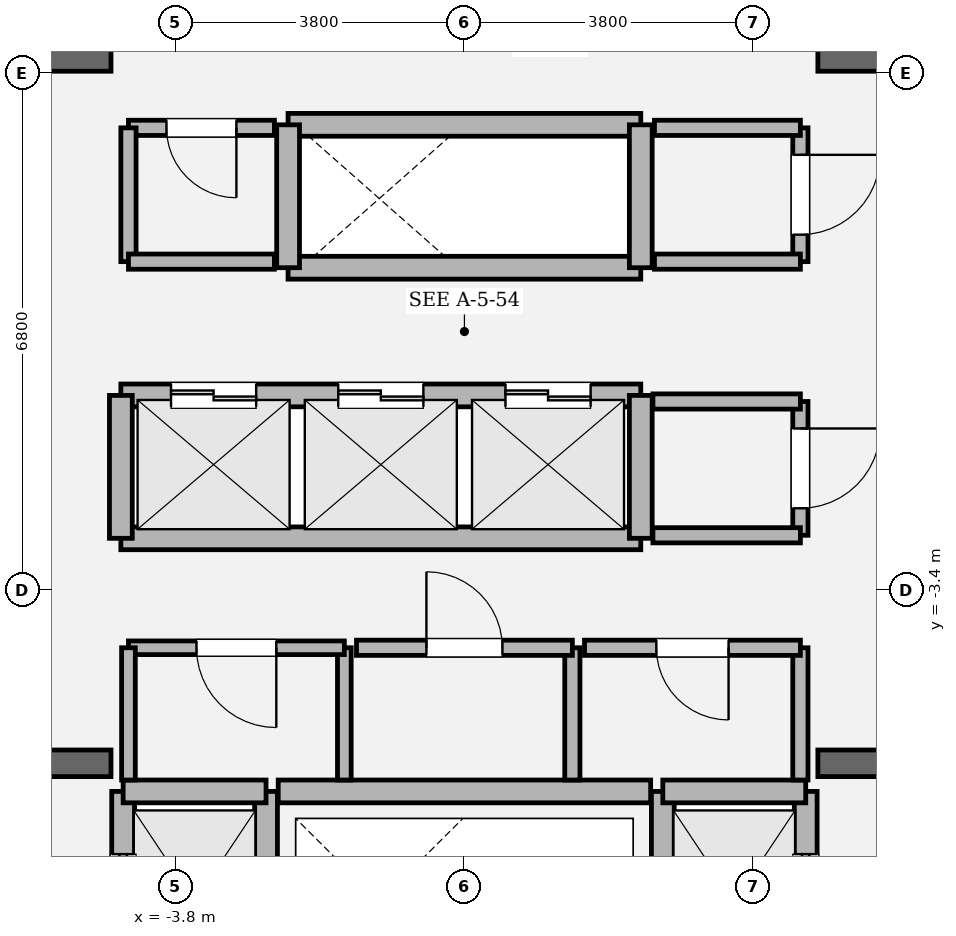
"""IFC4 building model, lengths in metres.
Left out: names, types, materials, properties, quantities, classifications, styles, units other than length and angle.
Written with IfcOpenShell. Run it as: python <this file> out.ifc"""

import sys

from ifc_helpers import new_model, si_unit, direction, frame, frame_2d, origin, place, context, subcontext, project, spatial, rectangle, extrude, element, fill, save


model = new_model("IFC4")
c1 = context("Model", 3, precision=1e-05, world=origin(), true_north=direction((0.0, 1.0)))
c2 = subcontext(c1, "Body", "Model", "MODEL_VIEW")
j1 = project(units=[si_unit("LENGTHUNIT", "METRE"), si_unit("PLANEANGLEUNIT", "RADIAN")], contexts=[c1])
p1 = place(None, origin())
s1 = spatial("IfcSite", under=j1, at=p1, CompositionType="ELEMENT")
p2 = place(p1, origin())
s2 = spatial("IfcBuilding", under=s1, at=p2, CompositionType="ELEMENT")
p3 = place(p2, frame((0.0, 0.0, 267.6)))
s3 = spatial("IfcBuildingStorey", under=s2, at=p3, CompositionType="ELEMENT", Elevation=267.6)
p4 = place(p3, frame((-9.925, -5.68, 0.0), z_axis=(0.0, 0.0, 1.0), x_axis=(1.0, 0.0, 0.0)))
e1 = element("IfcWall", 1, at=p4, inside=s3, PredefinedType="SOLIDWALL", context=c2, shape_type="SweptSolid", body=[
    extrude(rectangle(XDim=5.275, YDim=0.35, at=frame_2d((2.638, 0.0))), origin(), (0.0, 0.0, 1.0), 4.05),
])
p5 = place(p4, frame((1.385, 0.0, 0.0)))
e2 = element("IfcOpeningElement", 2, at=p5, cuts=e1, PredefinedType="OPENING", context=c2, shape_type="SweptSolid", body=[
    extrude(rectangle(XDim=1.18, YDim=2.2, at=frame_2d((0.59, 1.1))), frame((0.0, 0.185, 0.0), z_axis=(0.0, -1.0, 0.0), x_axis=(1.0, 0.0, 0.0)), (0.0, 0.0, 1.0), 0.37),
])
p6 = place(p3, frame((4.65, -5.68, 0.0), z_axis=(0.0, 0.0, 1.0), x_axis=(1.0, 0.0, 0.0)))
e3 = element("IfcWall", 3, at=p6, inside=s3, PredefinedType="SOLIDWALL", context=c2, shape_type="SweptSolid", body=[
    extrude(rectangle(XDim=5.275, YDim=0.35, at=frame_2d((2.638, 0.0))), origin(), (0.0, 0.0, 1.0), 4.05),
])
p7 = place(p6, frame((2.71, 0.0, 0.0)))
e4 = element("IfcOpeningElement", 4, at=p7, cuts=e3, PredefinedType="OPENING", context=c2, shape_type="SweptSolid", body=[
    extrude(rectangle(XDim=1.18, YDim=2.2, at=frame_2d((0.59, 1.1))), frame((0.0, 0.185, 0.0), z_axis=(0.0, -1.0, 0.0), x_axis=(1.0, 0.0, 0.0)), (0.0, 0.0, 1.0), 0.37),
])
for number, where, z_axis, x_axis in (
    (5, (-9.925, 3.6, 0.0), (0.0, 0.0, 1.0), (1.0, 0.0, 0.0)),
    (6, (4.65, 3.6, 0.0), (0.0, 0.0, 1.0), (1.0, 0.0, 0.0)),
):
    element("IfcWall", number, at=place(p3, frame(where, z_axis=z_axis, x_axis=x_axis)), inside=s3, PredefinedType="SOLIDWALL", context=c2, shape_type="SweptSolid", body=[
        extrude(rectangle(XDim=5.275, YDim=0.35, at=frame_2d((2.638, 0.0))), origin(), (0.0, 0.0, 1.0), 4.05),
    ])
p8 = place(p3, frame((-4.49, -8.82, 0.0), z_axis=(0.0, 0.0, 1.0), x_axis=(0.0, 1.0, 0.0)))
e7 = element("IfcWall", 7, at=p8, inside=s3, PredefinedType="SOLIDWALL", context=c2, shape_type="SweptSolid", body=[
    extrude(rectangle(XDim=2.77, YDim=0.3, at=frame_2d((1.385, 0.0))), origin(), (0.0, 0.0, 1.0), 3.85),
])
p9 = place(p8, frame((0.825, 0.0, 0.0)))
e8 = element("IfcOpeningElement", 8, at=p9, cuts=e7, PredefinedType="OPENING", context=c2, shape_type="SweptSolid", body=[
    extrude(rectangle(XDim=1.12, YDim=2.25, at=frame_2d((0.56, 1.125))), frame((0.0, 0.16, 0.0), z_axis=(0.0, -1.0, 0.0), x_axis=(1.0, 0.0, 0.0)), (0.0, 0.0, 1.0), 0.32),
])
p10 = place(p3, frame((-2.61, -8.82, 0.0), z_axis=(0.0, 0.0, 1.0), x_axis=(0.0, 1.0, 0.0)))
e9 = element("IfcWall", 9, at=p10, inside=s3, PredefinedType="SOLIDWALL", context=c2, shape_type="SweptSolid", body=[
    extrude(rectangle(XDim=2.77, YDim=0.3, at=frame_2d((1.385, 0.0))), origin(), (0.0, 0.0, 1.0), 3.85),
])
p11 = place(p3, frame((-4.49, -6.05, 0.0), z_axis=(0.0, 0.0, 1.0), x_axis=(1.0, 0.0, 0.0)))
e10 = element("IfcWall", 10, at=p11, inside=s3, PredefinedType="SOLIDWALL", context=c2, shape_type="SweptSolid", body=[
    extrude(rectangle(XDim=1.88, YDim=0.3, at=frame_2d((0.94, 0.0))), origin(), (0.0, 0.0, 1.0), 3.85),
])
p12 = place(p3, frame((4.49, -8.82, 0.0), z_axis=(0.0, 0.0, 1.0), x_axis=(0.0, 1.0, 0.0)))
e11 = element("IfcWall", 11, at=p12, inside=s3, PredefinedType="SOLIDWALL", context=c2, shape_type="SweptSolid", body=[
    extrude(rectangle(XDim=2.77, YDim=0.3, at=frame_2d((1.385, 0.0))), origin(), (0.0, 0.0, 1.0), 3.85),
])
p13 = place(p12, frame((0.825, 0.0, 0.0)))
e12 = element("IfcOpeningElement", 12, at=p13, cuts=e11, PredefinedType="OPENING", context=c2, shape_type="SweptSolid", body=[
    extrude(rectangle(XDim=1.12, YDim=2.25, at=frame_2d((0.56, 1.125))), frame((0.0, 0.16, 0.0), z_axis=(0.0, -1.0, 0.0), x_axis=(1.0, 0.0, 0.0)), (0.0, 0.0, 1.0), 0.32),
])
p14 = place(p3, frame((2.61, -8.82, 0.0), z_axis=(0.0, 0.0, 1.0), x_axis=(0.0, 1.0, 0.0)))
e13 = element("IfcWall", 13, at=p14, inside=s3, PredefinedType="SOLIDWALL", context=c2, shape_type="SweptSolid", body=[
    extrude(rectangle(XDim=2.77, YDim=0.3, at=frame_2d((1.385, 0.0))), origin(), (0.0, 0.0, 1.0), 3.85),
])
p15 = place(p3, frame((2.61, -6.05, 0.0), z_axis=(0.0, 0.0, 1.0), x_axis=(1.0, 0.0, 0.0)))
e14 = element("IfcWall", 14, at=p15, inside=s3, PredefinedType="SOLIDWALL", context=c2, shape_type="SweptSolid", body=[
    extrude(rectangle(XDim=1.88, YDim=0.3, at=frame_2d((0.94, 0.0))), origin(), (0.0, 0.0, 1.0), 3.85),
])
p16 = place(p3, frame((-4.52, -0.84, 0.0), z_axis=(0.0, 0.0, 1.0), x_axis=(1.0, 0.0, 0.0)))
e15 = element("IfcWall", 15, at=p16, inside=s3, PredefinedType="SOLIDWALL", context=c2, shape_type="SweptSolid", body=[
    extrude(rectangle(XDim=6.84, YDim=0.3, at=frame_2d((3.42, 0.0))), origin(), (0.0, 0.0, 1.0), 3.85),
])
p17 = place(p16, frame((0.66, 0.0, 0.0)))
e16 = element("IfcOpeningElement", 16, at=p17, cuts=e15, PredefinedType="OPENING", context=c2, shape_type="SweptSolid", body=[
    extrude(rectangle(XDim=1.12, YDim=2.25, at=frame_2d((0.56, 1.125))), frame((0.0, 0.16, 0.0), z_axis=(0.0, -1.0, 0.0), x_axis=(1.0, 0.0, 0.0)), (0.0, 0.0, 1.0), 0.32),
])
p18 = place(p16, frame((2.86, 0.0, 0.0)))
e17 = element("IfcOpeningElement", 17, at=p18, cuts=e15, PredefinedType="OPENING", context=c2, shape_type="SweptSolid", body=[
    extrude(rectangle(XDim=1.12, YDim=2.25, at=frame_2d((0.56, 1.125))), frame((0.0, 0.16, 0.0), z_axis=(0.0, -1.0, 0.0), x_axis=(1.0, 0.0, 0.0)), (0.0, 0.0, 1.0), 0.32),
])
p19 = place(p16, frame((5.06, 0.0, 0.0)))
e18 = element("IfcOpeningElement", 18, at=p19, cuts=e15, PredefinedType="OPENING", context=c2, shape_type="SweptSolid", body=[
    extrude(rectangle(XDim=1.12, YDim=2.25, at=frame_2d((0.56, 1.125))), frame((0.0, 0.16, 0.0), z_axis=(0.0, -1.0, 0.0), x_axis=(1.0, 0.0, 0.0)), (0.0, 0.0, 1.0), 0.32),
])
p20 = place(p3, frame((-4.52, -2.72, 0.0), z_axis=(0.0, 0.0, 1.0), x_axis=(1.0, 0.0, 0.0)))
e19 = element("IfcWall", 19, at=p20, inside=s3, PredefinedType="SOLIDWALL", context=c2, shape_type="SweptSolid", body=[
    extrude(rectangle(XDim=6.84, YDim=0.3, at=frame_2d((3.42, 0.0))), origin(), (0.0, 0.0, 1.0), 3.85),
])
for number, where, z_axis, x_axis in (
    (20, (-4.52, -2.72, 0.0), (0.0, 0.0, 1.0), (0.0, 1.0, 0.0)),
    (21, (2.32, -2.72, 0.0), (0.0, 0.0, 1.0), (0.0, 1.0, 0.0)),
):
    element("IfcWall", number, at=place(p3, frame(where, z_axis=z_axis, x_axis=x_axis)), inside=s3, PredefinedType="SOLIDWALL", context=c2, shape_type="SweptSolid", body=[
        extrude(rectangle(XDim=1.88, YDim=0.3, at=frame_2d((0.94, 0.0))), origin(), (0.0, 0.0, 1.0), 3.85),
    ])
for number, where, z_axis, x_axis in (
    (22, (-2.32, 0.84, 0.0), (0.0, 0.0, 1.0), (1.0, 0.0, 0.0)),
    (23, (-2.32, 2.72, 0.0), (0.0, 0.0, 1.0), (1.0, 0.0, 0.0)),
):
    element("IfcWall", number, at=place(p3, frame(where, z_axis=z_axis, x_axis=x_axis)), inside=s3, PredefinedType="SOLIDWALL", context=c2, shape_type="SweptSolid", body=[
        extrude(rectangle(XDim=4.64, YDim=0.3, at=frame_2d((2.32, 0.0))), origin(), (0.0, 0.0, 1.0), 3.85),
    ])
for number, where, z_axis, x_axis in (
    (24, (-2.32, 0.84, 0.0), (0.0, 0.0, 1.0), (0.0, 1.0, 0.0)),
    (25, (2.32, 0.84, 0.0), (0.0, 0.0, 1.0), (0.0, 1.0, 0.0)),
):
    element("IfcWall", number, at=place(p3, frame(where, z_axis=z_axis, x_axis=x_axis)), inside=s3, PredefinedType="SOLIDWALL", context=c2, shape_type="SweptSolid", body=[
        extrude(rectangle(XDim=1.88, YDim=0.3, at=frame_2d((0.94, 0.0))), origin(), (0.0, 0.0, 1.0), 3.85),
    ])
p21 = place(p3, frame((-2.45, -6.05, 0.0), z_axis=(0.0, 0.0, 1.0), x_axis=(1.0, 0.0, 0.0)))
e26 = element("IfcWall", 26, at=p21, inside=s3, PredefinedType="SOLIDWALL", context=c2, shape_type="SweptSolid", body=[
    extrude(rectangle(XDim=4.9, YDim=0.3, at=frame_2d((2.45, 0.0))), origin(), (0.0, 0.0, 1.0), 3.85),
])
p22 = place(p3, frame((-1.58, -5.9, 0.0), z_axis=(0.0, 0.0, 1.0), x_axis=(0.0, 1.0, 0.0)))
e27 = element("IfcWall", 27, at=p22, inside=s3, PredefinedType="PARTITIONING", context=c2, shape_type="SweptSolid", body=[
    extrude(rectangle(XDim=1.74, YDim=0.18, at=frame_2d((0.87, 0.0))), origin(), (0.0, 0.0, 1.0), 3.85),
])
p23 = place(p3, frame((-1.58, -4.16, 0.0), z_axis=(0.0, 0.0, 1.0), x_axis=(-1.0, 0.0, 0.0)))
e28 = element("IfcWall", 28, at=p23, inside=s3, PredefinedType="PARTITIONING", context=c2, shape_type="SweptSolid", body=[
    extrude(rectangle(XDim=2.84, YDim=0.18, at=frame_2d((1.42, 0.0))), origin(), (0.0, 0.0, 1.0), 3.85),
])
p24 = place(p23, frame((0.895, 0.0, 0.0)))
e29 = element("IfcOpeningElement", 29, at=p24, cuts=e28, PredefinedType="OPENING", context=c2, shape_type="SweptSolid", body=[
    extrude(rectangle(XDim=1.05, YDim=2.2, at=frame_2d((0.525, 1.1))), frame((0.0, 0.1, 0.0), z_axis=(0.0, -1.0, 0.0), x_axis=(1.0, 0.0, 0.0)), (0.0, 0.0, 1.0), 0.2),
])
p25 = place(p3, frame((-4.42, -4.16, 0.0), z_axis=(0.0, 0.0, 1.0), x_axis=(0.0, -1.0, 0.0)))
e30 = element("IfcWall", 30, at=p25, inside=s3, PredefinedType="PARTITIONING", context=c2, shape_type="SweptSolid", body=[
    extrude(rectangle(XDim=1.74, YDim=0.18, at=frame_2d((0.87, 0.0))), origin(), (0.0, 0.0, 1.0), 3.85),
])
p26 = place(p3, frame((1.42, -5.9, 0.0), z_axis=(0.0, 0.0, 1.0), x_axis=(0.0, 1.0, 0.0)))
e31 = element("IfcWall", 31, at=p26, inside=s3, PredefinedType="SOLIDWALL", context=c2, shape_type="SweptSolid", body=[
    extrude(rectangle(XDim=1.74, YDim=0.2, at=frame_2d((0.87, 0.0))), origin(), (0.0, 0.0, 1.0), 3.85),
])
p27 = place(p3, frame((1.42, -4.16, 0.0), z_axis=(0.0, 0.0, 1.0), x_axis=(-1.0, 0.0, 0.0)))
e32 = element("IfcWall", 32, at=p27, inside=s3, PredefinedType="SOLIDWALL", context=c2, shape_type="SweptSolid", body=[
    extrude(rectangle(XDim=2.84, YDim=0.2, at=frame_2d((1.42, 0.0))), origin(), (0.0, 0.0, 1.0), 3.85),
])
p28 = place(p27, frame((0.92, 0.0, 0.0)))
e33 = element("IfcOpeningElement", 33, at=p28, cuts=e32, PredefinedType="OPENING", context=c2, shape_type="SweptSolid", body=[
    extrude(rectangle(XDim=1.0, YDim=2.15, at=frame_2d((0.5, 1.075))), frame((0.0, 0.11, 0.0), z_axis=(0.0, -1.0, 0.0), x_axis=(1.0, 0.0, 0.0)), (0.0, 0.0, 1.0), 0.22),
])
p29 = place(p3, frame((4.42, -5.9, 0.0), z_axis=(0.0, 0.0, 1.0), x_axis=(0.0, 1.0, 0.0)))
e34 = element("IfcWall", 34, at=p29, inside=s3, PredefinedType="SOLIDWALL", context=c2, shape_type="SweptSolid", body=[
    extrude(rectangle(XDim=1.74, YDim=0.2, at=frame_2d((0.87, 0.0))), origin(), (0.0, 0.0, 1.0), 3.85),
])
p30 = place(p3, frame((4.42, -4.16, 0.0), z_axis=(0.0, 0.0, 1.0), x_axis=(-1.0, 0.0, 0.0)))
e35 = element("IfcWall", 35, at=p30, inside=s3, PredefinedType="SOLIDWALL", context=c2, shape_type="SweptSolid", body=[
    extrude(rectangle(XDim=2.84, YDim=0.2, at=frame_2d((1.42, 0.0))), origin(), (0.0, 0.0, 1.0), 3.85),
])
p31 = place(p30, frame((0.945, 0.0, 0.0)))
e36 = element("IfcOpeningElement", 36, at=p31, cuts=e35, PredefinedType="OPENING", context=c2, shape_type="SweptSolid", body=[
    extrude(rectangle(XDim=0.95, YDim=2.15, at=frame_2d((0.475, 1.075))), frame((0.0, 0.11, 0.0), z_axis=(0.0, -1.0, 0.0), x_axis=(1.0, 0.0, 0.0)), (0.0, 0.0, 1.0), 0.22),
])
p32 = place(p3, frame((4.42, -2.68, 0.0), z_axis=(0.0, 0.0, 1.0), x_axis=(0.0, 1.0, 0.0)))
e37 = element("IfcWall", 37, at=p32, inside=s3, PredefinedType="SOLIDWALL", context=c2, shape_type="SweptSolid", body=[
    extrude(rectangle(XDim=1.76, YDim=0.2, at=frame_2d((0.88, 0.0))), origin(), (0.0, 0.0, 1.0), 3.85),
])
p33 = place(p32, frame((0.355, 0.0, 0.0)))
e38 = element("IfcOpeningElement", 38, at=p33, cuts=e37, PredefinedType="OPENING", context=c2, shape_type="SweptSolid", body=[
    extrude(rectangle(XDim=1.05, YDim=2.2, at=frame_2d((0.525, 1.1))), frame((0.0, 0.11, 0.0), z_axis=(0.0, -1.0, 0.0), x_axis=(1.0, 0.0, 0.0)), (0.0, 0.0, 1.0), 0.22),
])
for number, where, z_axis, x_axis in (
    (39, (4.42, -0.92, 0.0), (0.0, 0.0, 1.0), (-1.0, 0.0, 0.0)),
    (40, (2.48, -2.68, 0.0), (0.0, 0.0, 1.0), (1.0, 0.0, 0.0)),
):
    element("IfcWall", number, at=place(p3, frame(where, z_axis=z_axis, x_axis=x_axis)), inside=s3, PredefinedType="SOLIDWALL", context=c2, shape_type="SweptSolid", body=[
        extrude(rectangle(XDim=1.94, YDim=0.2, at=frame_2d((0.97, 0.0))), origin(), (0.0, 0.0, 1.0), 3.85),
    ])
p34 = place(p3, frame((-2.5, 2.68, 0.0), z_axis=(0.0, 0.0, 1.0), x_axis=(-1.0, 0.0, 0.0)))
e41 = element("IfcWall", 41, at=p34, inside=s3, PredefinedType="SOLIDWALL", context=c2, shape_type="SweptSolid", body=[
    extrude(rectangle(XDim=1.92, YDim=0.2, at=frame_2d((0.96, 0.0))), origin(), (0.0, 0.0, 1.0), 3.85),
])
p35 = place(p34, frame((0.5, 0.0, 0.0)))
e42 = element("IfcOpeningElement", 42, at=p35, cuts=e41, PredefinedType="OPENING", context=c2, shape_type="SweptSolid", body=[
    extrude(rectangle(XDim=0.92, YDim=2.1, at=frame_2d((0.46, 1.05))), frame((0.0, 0.11, 0.0), z_axis=(0.0, -1.0, 0.0), x_axis=(1.0, 0.0, 0.0)), (0.0, 0.0, 1.0), 0.22),
])
p36 = place(p3, frame((-4.42, 2.68, 0.0), z_axis=(0.0, 0.0, 1.0), x_axis=(0.0, -1.0, 0.0)))
e43 = element("IfcWall", 43, at=p36, inside=s3, PredefinedType="SOLIDWALL", context=c2, shape_type="SweptSolid", body=[
    extrude(rectangle(XDim=1.76, YDim=0.2, at=frame_2d((0.88, 0.0))), origin(), (0.0, 0.0, 1.0), 3.85),
])
p37 = place(p3, frame((-4.42, 0.92, 0.0), z_axis=(0.0, 0.0, 1.0), x_axis=(1.0, 0.0, 0.0)))
e44 = element("IfcWall", 44, at=p37, inside=s3, PredefinedType="SOLIDWALL", context=c2, shape_type="SweptSolid", body=[
    extrude(rectangle(XDim=1.92, YDim=0.2, at=frame_2d((0.96, 0.0))), origin(), (0.0, 0.0, 1.0), 3.85),
])
p38 = place(p3, frame((4.42, 0.92, 0.0), z_axis=(0.0, 0.0, 1.0), x_axis=(0.0, 1.0, 0.0)))
e45 = element("IfcWall", 45, at=p38, inside=s3, PredefinedType="SOLIDWALL", context=c2, shape_type="SweptSolid", body=[
    extrude(rectangle(XDim=1.76, YDim=0.2, at=frame_2d((0.88, 0.0))), origin(), (0.0, 0.0, 1.0), 3.85),
])
p39 = place(p38, frame((0.355, 0.0, 0.0)))
e46 = element("IfcOpeningElement", 46, at=p39, cuts=e45, PredefinedType="OPENING", context=c2, shape_type="SweptSolid", body=[
    extrude(rectangle(XDim=1.05, YDim=2.2, at=frame_2d((0.525, 1.1))), frame((0.0, 0.11, 0.0), z_axis=(0.0, -1.0, 0.0), x_axis=(1.0, 0.0, 0.0)), (0.0, 0.0, 1.0), 0.22),
])
for number, where, z_axis, x_axis in (
    (47, (4.42, 2.68, 0.0), (0.0, 0.0, 1.0), (-1.0, 0.0, 0.0)),
    (48, (2.5, 0.92, 0.0), (0.0, 0.0, 1.0), (1.0, 0.0, 0.0)),
):
    element("IfcWall", number, at=place(p3, frame(where, z_axis=z_axis, x_axis=x_axis)), inside=s3, PredefinedType="SOLIDWALL", context=c2, shape_type="SweptSolid", body=[
        extrude(rectangle(XDim=1.92, YDim=0.2, at=frame_2d((0.96, 0.0))), origin(), (0.0, 0.0, 1.0), 3.85),
    ])
p40 = place(p9, origin())
e49 = element("IfcDoor", 49, at=p40, inside=s3, OperationType="SLIDING_TO_LEFT", PredefinedType="DOOR", context=c2, shape_type="SweptSolid", body=[
    extrude(rectangle(XDim=1.12, YDim=2.25, at=frame_2d((0.56, 1.125))), frame((0.0, 0.025, 0.0), z_axis=(0.0, -1.0, 0.0), x_axis=(1.0, 0.0, 0.0)), (0.0, 0.0, 1.0), 0.05),
])
fill(e8, e49)
p41 = place(p13, origin())
e50 = element("IfcDoor", 50, at=p41, inside=s3, OperationType="SLIDING_TO_RIGHT", PredefinedType="DOOR", context=c2, shape_type="SweptSolid", body=[
    extrude(rectangle(XDim=1.12, YDim=2.25, at=frame_2d((0.56, 1.125))), frame((0.0, 0.025, 0.0), z_axis=(0.0, -1.0, 0.0), x_axis=(1.0, 0.0, 0.0)), (0.0, 0.0, 1.0), 0.05),
])
fill(e12, e50)
p42 = place(p17, origin())
e51 = element("IfcDoor", 51, at=p42, inside=s3, OperationType="DOUBLE_DOOR_SLIDING", PredefinedType="DOOR", context=c2, shape_type="SweptSolid", body=[
    extrude(rectangle(XDim=1.12, YDim=2.25, at=frame_2d((0.56, 1.125))), frame((0.0, 0.025, 0.0), z_axis=(0.0, -1.0, 0.0), x_axis=(1.0, 0.0, 0.0)), (0.0, 0.0, 1.0), 0.05),
])
fill(e16, e51)
p43 = place(p18, origin())
e52 = element("IfcDoor", 52, at=p43, inside=s3, OperationType="DOUBLE_DOOR_SLIDING", PredefinedType="DOOR", context=c2, shape_type="SweptSolid", body=[
    extrude(rectangle(XDim=1.12, YDim=2.25, at=frame_2d((0.56, 1.125))), frame((0.0, 0.025, 0.0), z_axis=(0.0, -1.0, 0.0), x_axis=(1.0, 0.0, 0.0)), (0.0, 0.0, 1.0), 0.05),
])
fill(e17, e52)
p44 = place(p19, origin())
e53 = element("IfcDoor", 53, at=p44, inside=s3, OperationType="DOUBLE_DOOR_SLIDING", PredefinedType="DOOR", context=c2, shape_type="SweptSolid", body=[
    extrude(rectangle(XDim=1.12, YDim=2.25, at=frame_2d((0.56, 1.125))), frame((0.0, 0.025, 0.0), z_axis=(0.0, -1.0, 0.0), x_axis=(1.0, 0.0, 0.0)), (0.0, 0.0, 1.0), 0.05),
])
fill(e18, e53)
p45 = place(p24, origin())
e54 = element("IfcDoor", 54, at=p45, inside=s3, OperationType="SINGLE_SWING_LEFT", PredefinedType="DOOR", context=c2, shape_type="SweptSolid", body=[
    extrude(rectangle(XDim=1.05, YDim=2.2, at=frame_2d((0.525, 1.1))), frame((0.0, 0.025, 0.0), z_axis=(0.0, -1.0, 0.0), x_axis=(1.0, 0.0, 0.0)), (0.0, 0.0, 1.0), 0.05),
])
fill(e29, e54)
p46 = place(p28, origin())
e55 = element("IfcDoor", 55, at=p46, inside=s3, OperationType="SINGLE_SWING_RIGHT", PredefinedType="DOOR", context=c2, shape_type="SweptSolid", body=[
    extrude(rectangle(XDim=1.0, YDim=2.15, at=frame_2d((0.5, 1.075))), frame((0.0, 0.025, 0.0), z_axis=(0.0, -1.0, 0.0), x_axis=(1.0, 0.0, 0.0)), (0.0, 0.0, 1.0), 0.05),
])
fill(e33, e55)
p47 = place(p31, origin())
e56 = element("IfcDoor", 56, at=p47, inside=s3, OperationType="SINGLE_SWING_LEFT", PredefinedType="DOOR", context=c2, shape_type="SweptSolid", body=[
    extrude(rectangle(XDim=0.95, YDim=2.15, at=frame_2d((0.475, 1.075))), frame((0.0, 0.025, 0.0), z_axis=(0.0, -1.0, 0.0), x_axis=(1.0, 0.0, 0.0)), (0.0, 0.0, 1.0), 0.05),
])
fill(e36, e56)
p48 = place(p33, origin())
e57 = element("IfcDoor", 57, at=p48, inside=s3, OperationType="SINGLE_SWING_RIGHT", PredefinedType="DOOR", context=c2, shape_type="SweptSolid", body=[
    extrude(rectangle(XDim=1.05, YDim=2.2, at=frame_2d((0.525, 1.1))), frame((0.0, 0.025, 0.0), z_axis=(0.0, -1.0, 0.0), x_axis=(1.0, 0.0, 0.0)), (0.0, 0.0, 1.0), 0.05),
])
fill(e38, e57)
p49 = place(p35, origin())
e58 = element("IfcDoor", 58, at=p49, inside=s3, OperationType="SINGLE_SWING_LEFT", PredefinedType="DOOR", context=c2, shape_type="SweptSolid", body=[
    extrude(rectangle(XDim=0.92, YDim=2.1, at=frame_2d((0.46, 1.05))), frame((0.0, 0.025, 0.0), z_axis=(0.0, -1.0, 0.0), x_axis=(1.0, 0.0, 0.0)), (0.0, 0.0, 1.0), 0.05),
])
fill(e42, e58)
p50 = place(p39, origin())
e59 = element("IfcDoor", 59, at=p50, inside=s3, OperationType="SINGLE_SWING_RIGHT", PredefinedType="DOOR", context=c2, shape_type="SweptSolid", body=[
    extrude(rectangle(XDim=1.05, YDim=2.2, at=frame_2d((0.525, 1.1))), frame((0.0, 0.025, 0.0), z_axis=(0.0, -1.0, 0.0), x_axis=(1.0, 0.0, 0.0)), (0.0, 0.0, 1.0), 0.05),
])
fill(e46, e59)
save(model, sys.argv[1])
